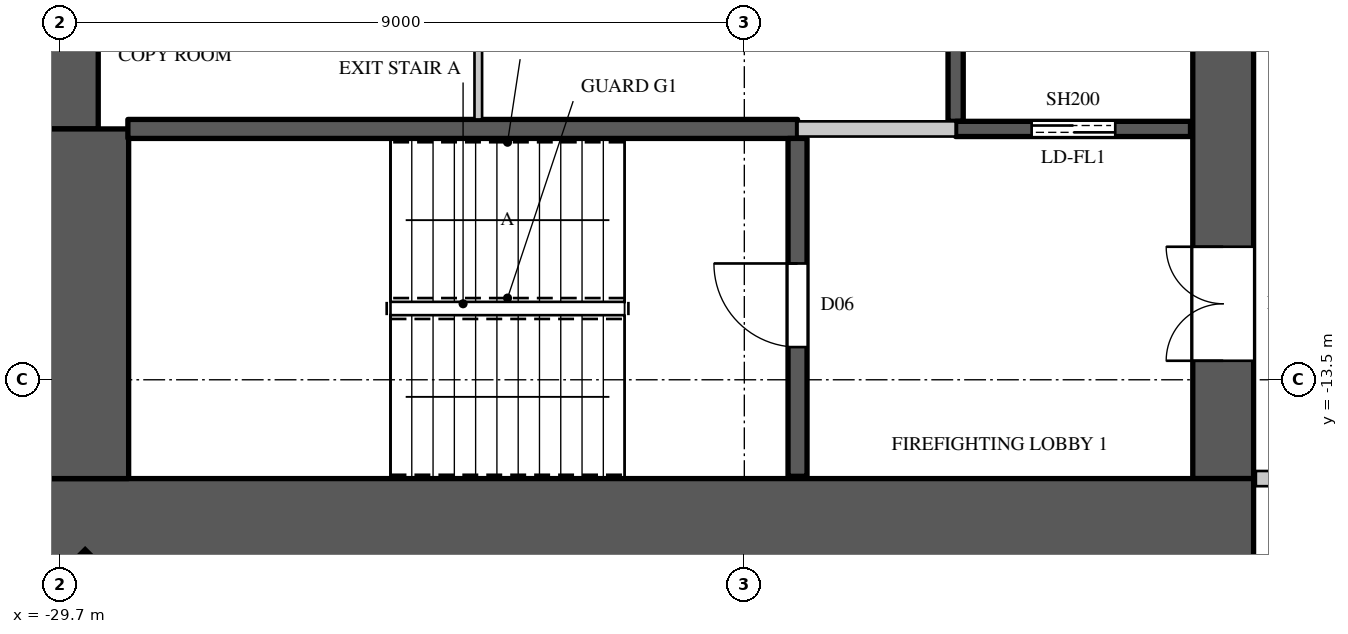
"""IFC4 building model, lengths in metres.
Left out: names, types, materials, properties, quantities, classifications, styles, units other than length and angle.
Written with IfcOpenShell. Run it as: python <this file> out.ifc"""

import sys

from ifc_helpers import new_model, si_unit, direction, frame, frame_2d, origin, origin_2d, place, context, subcontext, project, spatial, rectangle, extrude, element, fill, save


model = new_model("IFC4")
c1 = context("Model", 3, precision=1e-05, world=origin(), true_north=direction((0.0, 1.0)))
c2 = subcontext(c1, "Body", "Model", "MODEL_VIEW")
j1 = project(units=[si_unit("LENGTHUNIT", "METRE"), si_unit("PLANEANGLEUNIT", "RADIAN")], contexts=[c1])
p1 = place(None, origin())
s1 = spatial("IfcSite", under=j1, at=p1, CompositionType="ELEMENT")
p2 = place(p1, origin())
s2 = spatial("IfcBuilding", under=s1, at=p2, CompositionType="ELEMENT")
p3 = place(p2, frame((0.0, 0.0, 234.3)))
s3 = spatial("IfcBuildingStorey", under=s2, at=p3, CompositionType="ELEMENT", Elevation=234.3)
p4 = place(p3, frame((-29.443, -16.443, 0.0), z_axis=(0.0, 0.0, 1.0), x_axis=(0.707106781187, -0.707106781187, 0.0)))
e1 = element("IfcColumn", 1, at=p4, inside=s3, PredefinedType="COLUMN", context=c2, shape_type="SweptSolid", body=[
    extrude(rectangle(XDim=0.9, YDim=1.1, at=origin_2d()), origin(), (0.0, 0.0, 1.0), 4.1),
])
p5 = place(p3, frame((-30.0, -15.4, 0.0), z_axis=(0.0, 0.0, 1.0), x_axis=(1.0, 0.0, 0.0)))
e2 = element("IfcWall", 2, at=p5, inside=s3, PredefinedType="SHEAR", context=c2, shape_type="SweptSolid", body=[
    extrude(rectangle(XDim=16.0, YDim=1.2, at=frame_2d((8.0, 0.0))), origin(), (0.0, 0.0, 1.0), 4.1),
])
p6 = place(p3, frame((-14.4, -14.8, 0.0), z_axis=(0.0, 0.0, 1.0), x_axis=(0.0, 1.0, 0.0)))
e3 = element("IfcWall", 3, at=p6, inside=s3, PredefinedType="SHEAR", context=c2, shape_type="SweptSolid", body=[
    extrude(rectangle(XDim=29.6, YDim=0.8, at=frame_2d((14.8, 0.0))), origin(), (0.0, 0.0, 1.0), 4.1),
])
p7 = place(p6, frame((1.55, 0.0, 0.0)))
e4 = element("IfcOpeningElement", 4, at=p7, cuts=e3, PredefinedType="OPENING", context=c2, shape_type="SweptSolid", body=[
    extrude(rectangle(XDim=1.5, YDim=2.4, at=frame_2d((0.75, 1.2))), frame((0.0, 0.41, 0.0), z_axis=(0.0, -1.0, 0.0), x_axis=(1.0, 0.0, 0.0)), (0.0, 0.0, 1.0), 0.82),
])
p8 = place(p6, frame((26.55, 0.0, 0.0)))
e5 = element("IfcOpeningElement", 5, at=p8, cuts=e3, PredefinedType="OPENING", context=c2, shape_type="SweptSolid", body=[
    extrude(rectangle(XDim=1.5, YDim=2.4, at=frame_2d((0.75, 1.2))), frame((0.0, 0.41, 0.0), z_axis=(0.0, -1.0, 0.0), x_axis=(1.0, 0.0, 0.0)), (0.0, 0.0, 1.0), 0.82),
])
p9 = place(p6, frame((8.45, 0.0, 0.0)))
e6 = element("IfcOpeningElement", 6, at=p9, cuts=e3, PredefinedType="OPENING", context=c2, shape_type="SweptSolid", body=[
    extrude(rectangle(XDim=1.5, YDim=2.4, at=frame_2d((0.75, 1.2))), frame((0.0, 0.41, 0.0), z_axis=(0.0, -1.0, 0.0), x_axis=(1.0, 0.0, 0.0)), (0.0, 0.0, 1.0), 0.82),
])
p10 = place(p6, frame((19.65, 0.0, 0.0)))
e7 = element("IfcOpeningElement", 7, at=p10, cuts=e3, PredefinedType="OPENING", context=c2, shape_type="SweptSolid", body=[
    extrude(rectangle(XDim=1.5, YDim=2.4, at=frame_2d((0.75, 1.2))), frame((0.0, 0.41, 0.0), z_axis=(0.0, -1.0, 0.0), x_axis=(1.0, 0.0, 0.0)), (0.0, 0.0, 1.0), 0.82),
])
p11 = place(p6, frame((14.5, 0.0, 0.0)))
e8 = element("IfcOpeningElement", 8, at=p11, cuts=e3, PredefinedType="OPENING", context=c2, shape_type="SweptSolid", body=[
    extrude(rectangle(XDim=0.6, YDim=2.0, at=frame_2d((0.3, 1.0))), frame((0.0, 0.41, 0.0), z_axis=(0.0, -1.0, 0.0), x_axis=(1.0, 0.0, 0.0)), (0.0, 0.0, 1.0), 0.82),
])
p12 = place(p3, frame((-29.6, -10.2, 0.0), z_axis=(0.0, 0.0, 1.0), x_axis=(0.0, 1.0, 0.0)))
e9 = element("IfcWall", 9, at=p12, inside=s3, PredefinedType="SHEAR", context=c2, shape_type="SweptSolid", body=[
    extrude(rectangle(XDim=20.4, YDim=0.8, at=frame_2d((10.2, 0.0))), origin(), (0.0, 0.0, 1.0), 4.1),
])
p13 = place(p3, frame((-29.4, -14.8, 0.0), z_axis=(0.0, 0.0, 1.0), x_axis=(0.0, 1.0, 0.0)))
e10 = element("IfcWall", 10, at=p13, inside=s3, PredefinedType="SHEAR", context=c2, shape_type="SweptSolid", body=[
    extrude(rectangle(XDim=4.6, YDim=1.2, at=frame_2d((2.3, 0.0))), origin(), (0.0, 0.0, 1.0), 4.1),
])
p14 = place(p3, frame((-20.0, -10.2, 0.0), z_axis=(0.0, 0.0, 1.0), x_axis=(1.0, 0.0, 0.0)))
e11 = element("IfcWall", 11, at=p14, inside=s3, PredefinedType="PARTITIONING", context=c2, shape_type="SweptSolid", body=[
    extrude(rectangle(XDim=2.08, YDim=0.2, at=frame_2d((1.04, 0.0))), origin(), (0.0, 0.0, 1.0), 3.8),
])
p15 = place(p3, frame((-13.97, -14.8, 0.0), z_axis=(0.0, 0.0, 1.0), x_axis=(1.0, 0.0, 0.0)))
e12 = element("IfcWall", 12, at=p15, inside=s3, PredefinedType="PARTITIONING", context=c2, shape_type="SweptSolid", body=[
    extrude(rectangle(XDim=2.87, YDim=0.2, at=frame_2d((1.435, 0.0))), origin(), (0.0, 0.0, 1.0), 3.8),
])
p16 = place(p3, frame((-17.92, -10.1, 0.0), z_axis=(0.0, 0.0, 1.0), x_axis=(0.0, 1.0, 0.0)))
e13 = element("IfcWall", 13, at=p16, inside=s3, PredefinedType="SHEAR", context=c2, shape_type="SweptSolid", body=[
    extrude(rectangle(XDim=2.6, YDim=0.2, at=frame_2d((1.3, 0.0))), origin(), (0.0, 0.0, 1.0), 3.8),
])
p17 = place(p3, frame((-17.92, -10.2, 0.0), z_axis=(0.0, 0.0, 1.0), x_axis=(1.0, 0.0, 0.0)))
e14 = element("IfcWall", 14, at=p17, inside=s3, PredefinedType="SHEAR", context=c2, shape_type="SweptSolid", body=[
    extrude(rectangle(XDim=3.09, YDim=0.2, at=frame_2d((1.545, 0.0))), origin(), (0.0, 0.0, 1.0), 3.8),
])
p18 = place(p17, frame((1.0, 0.0, 0.0)))
e15 = element("IfcOpeningElement", 15, at=p18, cuts=e14, PredefinedType="OPENING", context=c2, shape_type="SweptSolid", body=[
    extrude(rectangle(XDim=1.1, YDim=2.2, at=frame_2d((0.55, 1.1))), frame((0.0, 0.11, 0.0), z_axis=(0.0, -1.0, 0.0), x_axis=(1.0, 0.0, 0.0)), (0.0, 0.0, 1.0), 0.22),
])
p19 = place(p3, frame((-28.81, -10.2, 0.0), z_axis=(0.0, 0.0, 1.0), x_axis=(1.0, 0.0, 0.0)))
e16 = element("IfcWall", 16, at=p19, inside=s3, PredefinedType="SHEAR", context=c2, shape_type="SweptSolid", body=[
    extrude(rectangle(XDim=8.81, YDim=0.25, at=frame_2d((4.405, 0.0))), origin(), (0.0, 0.0, 1.0), 3.8),
])
p20 = place(p3, frame((-20.0, -14.77, 0.0), z_axis=(0.0, 0.0, 1.0), x_axis=(0.0, 1.0, 0.0)))
e17 = element("IfcWall", 17, at=p20, inside=s3, PredefinedType="SHEAR", context=c2, shape_type="SweptSolid", body=[
    extrude(rectangle(XDim=4.445, YDim=0.25, at=frame_2d((2.223, 0.0))), origin(), (0.0, 0.0, 1.0), 3.8),
])
p21 = place(p20, frame((1.7, 0.0, 0.0)))
e18 = element("IfcOpeningElement", 18, at=p21, cuts=e17, PredefinedType="OPENING", context=c2, shape_type="SweptSolid", body=[
    extrude(rectangle(XDim=1.1, YDim=2.2, at=frame_2d((0.55, 1.1))), frame((0.0, 0.135, 0.0), z_axis=(0.0, -1.0, 0.0), x_axis=(1.0, 0.0, 0.0)), (0.0, 0.0, 1.0), 0.27),
])
p22 = place(p3, frame((-24.2, -10.075, 0.0), z_axis=(0.0, 0.0, 1.0), x_axis=(0.0, 1.0, 0.0)))
e19 = element("IfcWall", 19, at=p22, inside=s3, PredefinedType="PARTITIONING", context=c2, shape_type="SweptSolid", body=[
    extrude(rectangle(XDim=2.575, YDim=0.1, at=frame_2d((1.288, 0.0))), origin(), (0.0, 0.0, 1.0), 3.8),
])
p23 = place(p21, origin())
e20 = element("IfcDoor", 20, at=p23, inside=s3, OperationType="SINGLE_SWING_RIGHT", PredefinedType="DOOR", context=c2, shape_type="SweptSolid", body=[
    extrude(rectangle(XDim=1.1, YDim=2.2, at=frame_2d((0.55, 1.1))), frame((0.0, 0.025, 0.0), z_axis=(0.0, -1.0, 0.0), x_axis=(1.0, 0.0, 0.0)), (0.0, 0.0, 1.0), 0.05),
])
fill(e18, e20)
p24 = place(p18, origin())
e21 = element("IfcDoor", 21, at=p24, inside=s3, OperationType="DOUBLE_DOOR_SLIDING", PredefinedType="DOOR", context=c2, shape_type="SweptSolid", body=[
    extrude(rectangle(XDim=1.1, YDim=2.2, at=frame_2d((0.55, 1.1))), frame((0.0, 0.025, 0.0), z_axis=(0.0, -1.0, 0.0), x_axis=(1.0, 0.0, 0.0)), (0.0, 0.0, 1.0), 0.05),
])
fill(e15, e21)
p25 = place(p7, origin())
e22 = element("IfcDoor", 22, at=p25, inside=s3, OperationType="DOUBLE_DOOR_SINGLE_SWING", PredefinedType="DOOR", context=c2, shape_type="SweptSolid", body=[
    extrude(rectangle(XDim=1.5, YDim=2.4, at=frame_2d((0.75, 1.2))), frame((0.0, 0.395, 0.0), z_axis=(0.0, -1.0, 0.0), x_axis=(1.0, 0.0, 0.0)), (0.0, 0.0, 1.0), 0.05),
])
fill(e4, e22)
save(model, sys.argv[1])
